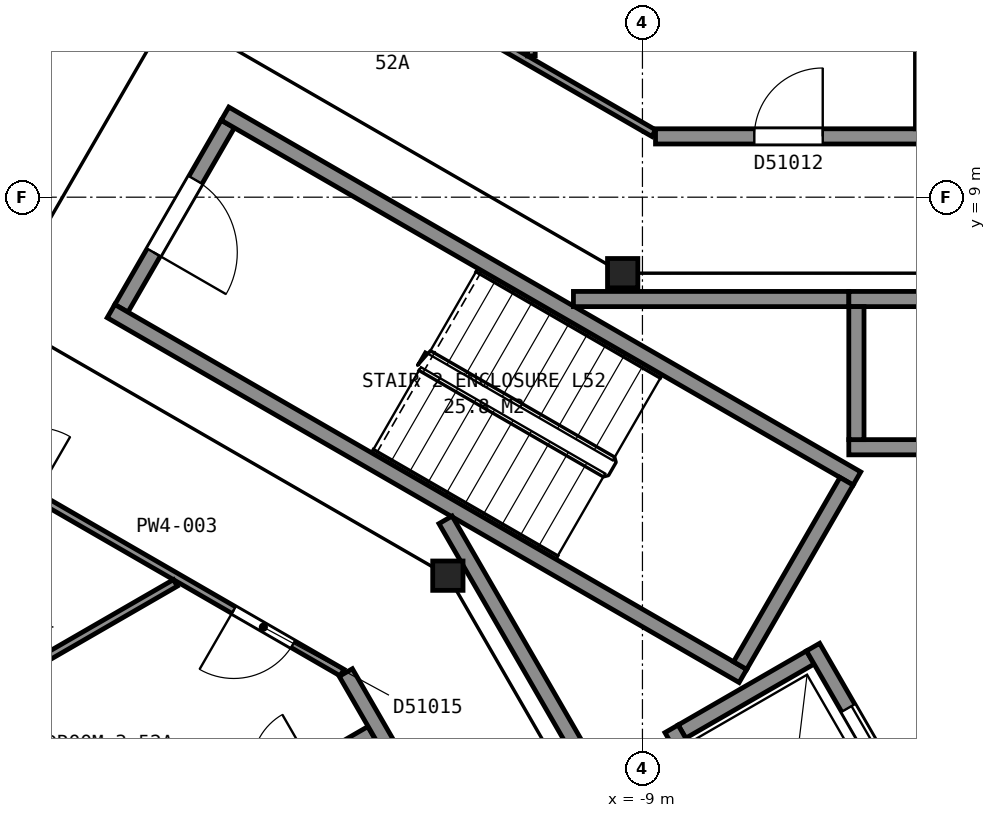
"""IFC4 building model, lengths in metres.
Left out: names, types, materials, properties, quantities, classifications, styles, units other than length and angle.
Written with IfcOpenShell. Run it as: python <this file> out.ifc"""

import sys

from ifc_helpers import new_model, si_unit, direction, frame, frame_2d, origin, origin_2d, place, context, subcontext, project, spatial, rectangle, i_section, extrude, element, fill, save


model = new_model("IFC4")
c1 = context("Model", 3, precision=1e-05, world=origin(), true_north=direction((0.0, 1.0)))
c2 = subcontext(c1, "Body", "Model", "MODEL_VIEW")
j1 = project(units=[si_unit("LENGTHUNIT", "METRE"), si_unit("PLANEANGLEUNIT", "RADIAN")], contexts=[c1])
p1 = place(None, origin())
s1 = spatial("IfcSite", under=j1, at=p1, CompositionType="ELEMENT")
p2 = place(p1, origin())
s2 = spatial("IfcBuilding", under=s1, at=p2, CompositionType="ELEMENT")
p3 = place(p2, frame((0.0, 0.0, 210.1)))
s3 = spatial("IfcBuildingStorey", under=s2, at=p3, CompositionType="ELEMENT", Elevation=210.1)
for number, where, z_axis, x_axis in (
    (1, (-9.26, 8.0, 0.0), (0.0, 0.0, 1.0), (1.0, 0.0, 0.0)),
    (2, (-11.56, 4.02, 0.0), (0.0, 0.0, 1.0), (1.0, 0.0, 0.0)),
):
    element("IfcColumn", number, at=place(p3, frame(where, z_axis=z_axis, x_axis=x_axis)), inside=s3, PredefinedType="COLUMN", context=c2, shape_type="SweptSolid", body=[
        extrude(i_section(OverallWidth=0.399, OverallDepth=0.386, WebThickness=0.021, FlangeThickness=0.033, FilletRadius=0.015, at=origin_2d()), origin(), (0.0, 0.0, 1.0), 3.7),
    ])
p4 = place(p3, frame((-14.455, 9.962, 0.0), z_axis=(0.0, 0.0, 1.0), x_axis=(-0.500049511043, -0.865996816683, 0.0)))
e3 = element("IfcWall", 3, at=p4, inside=s3, PredefinedType="PARTITIONING", context=c2, shape_type="SweptSolid", body=[
    extrude(rectangle(XDim=2.8, YDim=0.2, at=frame_2d((1.4, 0.0))), origin(), (0.0, 0.0, 1.0), 3.45),
])
p5 = place(p4, frame((0.85, 0.0, 0.0)))
e4 = element("IfcOpeningElement", 4, at=p5, cuts=e3, PredefinedType="OPENING", context=c2, shape_type="SweptSolid", body=[
    extrude(rectangle(XDim=1.1, YDim=2.1, at=frame_2d((0.55, 1.05))), frame((0.0, 0.11, 0.0), z_axis=(0.0, -1.0, 0.0), x_axis=(1.0, 0.0, 0.0)), (0.0, 0.0, 1.0), 0.22),
])
for number, where, z_axis, x_axis in (
    (5, (-7.678, 2.701, 0.0), (0.0, 0.0, 1.0), (-0.866, 0.5, 0.0)),
    (6, (-6.178, 5.299, 0.0), (0.0, 0.0, 1.0), (-0.866, 0.5, 0.0)),
):
    element("IfcWall", number, at=place(p3, frame(where, z_axis=z_axis, x_axis=x_axis)), inside=s3, PredefinedType="PARTITIONING", context=c2, shape_type="SweptSolid", body=[
        extrude(rectangle(XDim=9.6, YDim=0.2, at=frame_2d((4.8, 0.0))), origin(), (0.0, 0.0, 1.0), 3.45),
    ])
p6 = place(p3, frame((-6.315, 5.262, 0.0), z_axis=(0.0, 0.0, 1.0), x_axis=(-0.500049511043, -0.865996816683, 0.0)))
e7 = element("IfcWall", 7, at=p6, inside=s3, PredefinedType="PARTITIONING", context=c2, shape_type="SweptSolid", body=[
    extrude(rectangle(XDim=2.8, YDim=0.2, at=frame_2d((1.4, 0.0))), origin(), (0.0, 0.0, 1.0), 3.45),
])
for number, where, z_axis, x_axis in (
    (8, (-6.285, 5.71, 0.0), (0.0, 0.0, 1.0), (1.0, 0.0, 0.0)),
    (9, (-6.285, 7.66, 0.0), (0.0, 0.0, 1.0), (1.0, 0.0, 0.0)),
):
    element("IfcWall", number, at=place(p3, frame(where, z_axis=z_axis, x_axis=x_axis)), inside=s3, PredefinedType="PARTITIONING", context=c2, shape_type="SweptSolid", body=[
        extrude(rectangle(XDim=2.35, YDim=0.2, at=frame_2d((1.175, 0.0))), origin(), (0.0, 0.0, 1.0), 3.7),
    ])
p7 = place(p3, frame((-8.48, 1.969, 0.0), z_axis=(0.0, 0.0, 1.0), x_axis=(0.866000020948, 0.500043961785, 0.0)))
e10 = element("IfcWall", 10, at=p7, inside=s3, PredefinedType="PARTITIONING", context=c2, shape_type="SweptSolid", body=[
    extrude(rectangle(XDim=1.95, YDim=0.2, at=frame_2d((0.975, 0.0))), origin(), (0.0, 0.0, 1.0), 3.7),
])
p8 = place(p3, frame((-6.185, 5.81, 0.0), z_axis=(0.0, 0.0, 1.0), x_axis=(0.0, 1.0, 0.0)))
e11 = element("IfcWall", 11, at=p8, inside=s3, PredefinedType="PARTITIONING", context=c2, shape_type="SweptSolid", body=[
    extrude(rectangle(XDim=1.75, YDim=0.2, at=frame_2d((0.875, 0.0))), origin(), (0.0, 0.0, 1.0), 3.7),
])
p9 = place(p3, frame((-5.28, 0.525, 0.0), z_axis=(0.0, 0.0, 1.0), x_axis=(-0.500037662692, 0.866003658127, 0.0)))
e12 = element("IfcWall", 12, at=p9, inside=s3, PredefinedType="PARTITIONING", context=c2, shape_type="SweptSolid", body=[
    extrude(rectangle(XDim=2.95, YDim=0.2, at=frame_2d((1.475, 0.0))), origin(), (0.0, 0.0, 1.0), 3.7),
])
p10 = place(p9, frame((0.925, 0.0, 0.0)))
e13 = element("IfcOpeningElement", 13, at=p10, cuts=e12, PredefinedType="OPENING", context=c2, shape_type="SweptSolid", body=[
    extrude(rectangle(XDim=1.1, YDim=2.1, at=frame_2d((0.55, 1.05))), frame((0.0, 0.11, 0.0), z_axis=(0.0, -1.0, 0.0), x_axis=(1.0, 0.0, 0.0)), (0.0, 0.0, 1.0), 0.22),
])
p11 = place(p3, frame((-7.242, -0.376, 0.0), z_axis=(0.0, 0.0, 1.0), x_axis=(-0.499996545922, 0.866027397988, 0.0)))
e14 = element("IfcWall", 14, at=p11, inside=s3, PredefinedType="PARTITIONING", context=c2, shape_type="SweptSolid", body=[
    extrude(rectangle(XDim=2.75, YDim=0.2, at=frame_2d((1.375, 0.0))), origin(), (0.0, 0.0, 1.0), 3.7),
])
p12 = place(p3, frame((-11.591, 4.755, 0.0), z_axis=(0.0, 0.0, 1.0), x_axis=(0.500043977787, -0.866000011708, 0.0)))
e15 = element("IfcWall", 15, at=p12, inside=s3, PredefinedType="PARTITIONING", context=c2, shape_type="SweptSolid", body=[
    extrude(rectangle(XDim=6.617, YDim=0.2, at=frame_2d((3.308, 0.0))), origin(), (0.0, 0.0, 1.0), 3.45),
])
p13 = place(p12, frame((3.695, 0.0, 0.0)))
e16 = element("IfcOpeningElement", 16, at=p13, cuts=e15, PredefinedType="OPENING", context=c2, shape_type="SweptSolid", body=[
    extrude(rectangle(XDim=1.8, YDim=2.1, at=frame_2d((0.9, 1.05))), frame((0.0, 0.11, 0.0), z_axis=(0.0, -1.0, 0.0), x_axis=(1.0, 0.0, 0.0)), (0.0, 0.0, 1.0), 0.22),
])
p14 = place(p3, frame((-9.908, 7.66, 0.0), z_axis=(0.0, 0.0, 1.0), x_axis=(1.0, 0.0, 0.0)))
e17 = element("IfcWall", 17, at=p14, inside=s3, PredefinedType="PARTITIONING", context=c2, shape_type="SweptSolid", body=[
    extrude(rectangle(XDim=3.621, YDim=0.2, at=frame_2d((1.811, 0.0))), origin(), (0.0, 0.0, 1.0), 3.45),
])
p15 = place(p3, frame((-19.955, 6.844, 0.0), z_axis=(0.0, 0.0, 1.0), x_axis=(0.500415732313, 0.865785247537, 0.0)))
e18 = element("IfcWall", 18, at=p15, inside=s3, PredefinedType="PARTITIONING", context=c2, shape_type="SweptSolid", body=[
    extrude(rectangle(XDim=8.097, YDim=0.1, at=frame_2d((4.049, 0.0))), origin(), (0.0, 0.0, 1.0), 2.713),
])
p16 = place(p15, frame((3.6, 0.0, 0.0)))
e19 = element("IfcOpeningElement", 19, at=p16, cuts=e18, PredefinedType="OPENING", context=c2, shape_type="SweptSolid", body=[
    extrude(rectangle(XDim=0.9, YDim=2.1, at=frame_2d((0.45, 1.05))), frame((0.0, 0.06, 0.0), z_axis=(0.0, -1.0, 0.0), x_axis=(1.0, 0.0, 0.0)), (0.0, 0.0, 1.0), 0.12),
])
p17 = place(p3, frame((-12.952, 2.744, 0.0), z_axis=(0.0, 0.0, 1.0), x_axis=(-0.86608949446, 0.499888975259, 0.0)))
e20 = element("IfcWall", 20, at=p17, inside=s3, PredefinedType="PARTITIONING", context=c2, shape_type="SweptSolid", body=[
    extrude(rectangle(XDim=8.165, YDim=0.1, at=frame_2d((4.083, 0.0))), origin(), (0.0, 0.0, 1.0), 2.713),
])
p18 = place(p17, frame((4.65, 0.0, 0.0)))
e21 = element("IfcOpeningElement", 21, at=p18, cuts=e20, PredefinedType="OPENING", context=c2, shape_type="SweptSolid", body=[
    extrude(rectangle(XDim=0.9, YDim=2.1, at=frame_2d((0.45, 1.05))), frame((0.0, 0.06, 0.0), z_axis=(0.0, -1.0, 0.0), x_axis=(1.0, 0.0, 0.0)), (0.0, 0.0, 1.0), 0.12),
])
p19 = place(p17, frame((0.746, 0.0, 0.0)))
e22 = element("IfcOpeningElement", 22, at=p19, cuts=e20, PredefinedType="OPENING", context=c2, shape_type="SweptSolid", body=[
    extrude(rectangle(XDim=0.9, YDim=2.1, at=frame_2d((0.45, 1.05))), frame((0.0, 0.06, 0.0), z_axis=(0.0, -1.0, 0.0), x_axis=(1.0, 0.0, 0.0)), (0.0, 0.0, 1.0), 0.12),
])
p20 = place(p3, frame((-18.308, 2.099, 0.0), z_axis=(0.0, 0.0, 1.0), x_axis=(0.866054218355, 0.499950088379, 0.0)))
e23 = element("IfcWall", 23, at=p20, inside=s3, PredefinedType="PARTITIONING", context=c2, shape_type="SweptSolid", body=[
    extrude(rectangle(XDim=3.652, YDim=0.1, at=frame_2d((1.826, 0.0))), origin(), (0.0, 0.0, 1.0), 2.713),
])
p21 = place(p3, frame((-15.921, 13.923, 0.0), z_axis=(0.0, 0.0, 1.0), x_axis=(0.866088973199, -0.499889878377, 0.0)))
e24 = element("IfcWall", 24, at=p21, inside=s3, PredefinedType="PARTITIONING", context=c2, shape_type="SweptSolid", body=[
    extrude(rectangle(XDim=8.163, YDim=0.1, at=frame_2d((4.082, 0.0))), origin(), (0.0, 0.0, 1.0), 2.713),
])
p22 = place(p3, frame((-12.563, 1.948, 0.0), z_axis=(0.0, 0.0, 1.0), x_axis=(-0.866041588165, -0.499971966783, 0.0)))
e25 = element("IfcWall", 25, at=p22, inside=s3, PredefinedType="PARTITIONING", context=c2, shape_type="SweptSolid", body=[
    extrude(rectangle(XDim=2.795, YDim=0.2, at=frame_2d((1.397, 0.0))), origin(), (0.0, 0.0, 1.0), 2.713),
])
p23 = place(p22, frame((0.895, 0.0, 0.0)))
e26 = element("IfcOpeningElement", 26, at=p23, cuts=e25, PredefinedType="OPENING", context=c2, shape_type="SweptSolid", body=[
    extrude(rectangle(XDim=0.8, YDim=2.1, at=frame_2d((0.4, 1.05))), frame((0.0, 0.11, 0.0), z_axis=(0.0, -1.0, 0.0), x_axis=(1.0, 0.0, 0.0)), (0.0, 0.0, 1.0), 0.22),
])
p24 = place(p3, frame((-4.075, -12.545, 0.0), z_axis=(0.0, 0.0, 1.0), x_axis=(-0.499999743747, 0.866025551732, 0.0)))
e27 = element("IfcWall", 27, at=p24, inside=s3, PredefinedType="PARTITIONING", context=c2, shape_type="SweptSolid", body=[
    extrude(rectangle(XDim=17.656, YDim=0.2, at=frame_2d((8.828, 0.0))), origin(), (0.0, 0.0, 1.0), 2.713),
])
p25 = place(p24, frame((9.895, 0.0, 0.0)))
e28 = element("IfcOpeningElement", 28, at=p25, cuts=e27, PredefinedType="OPENING", context=c2, shape_type="SweptSolid", body=[
    extrude(rectangle(XDim=0.9, YDim=2.1, at=frame_2d((0.45, 1.05))), frame((0.0, 0.11, 0.0), z_axis=(0.0, -1.0, 0.0), x_axis=(1.0, 0.0, 0.0)), (0.0, 0.0, 1.0), 0.22),
])
p26 = place(p24, frame((6.622, 0.0, 0.0)))
e29 = element("IfcOpeningElement", 29, at=p26, cuts=e27, PredefinedType="OPENING", context=c2, shape_type="SweptSolid", body=[
    extrude(rectangle(XDim=0.9, YDim=2.1, at=frame_2d((0.45, 1.05))), frame((0.0, 0.11, 0.0), z_axis=(0.0, -1.0, 0.0), x_axis=(1.0, 0.0, 0.0)), (0.0, 0.0, 1.0), 0.22),
])
p27 = place(p24, frame((0.268, 0.0, 0.0)))
e30 = element("IfcOpeningElement", 30, at=p27, cuts=e27, PredefinedType="OPENING", context=c2, shape_type="SweptSolid", body=[
    extrude(rectangle(XDim=0.9, YDim=2.1, at=frame_2d((0.45, 1.05))), frame((0.0, 0.11, 0.0), z_axis=(0.0, -1.0, 0.0), x_axis=(1.0, 0.0, 0.0)), (0.0, 0.0, 1.0), 0.22),
])
p28 = place(p3, frame((-10.461, 10.859, 0.0), z_axis=(0.0, 0.0, 1.0), x_axis=(0.0, 1.0, 0.0)))
e31 = element("IfcWall", 31, at=p28, inside=s3, PredefinedType="PARTITIONING", context=c2, shape_type="SweptSolid", body=[
    extrude(rectangle(XDim=3.947, YDim=0.1, at=frame_2d((1.974, 0.0))), origin(), (0.0, 0.0, 1.0), 2.713),
])
p29 = place(p3, frame((-8.828, 9.8, 0.0), z_axis=(0.0, 0.0, 1.0), x_axis=(1.0, 0.0, 0.0)))
e32 = element("IfcWall", 32, at=p29, inside=s3, PredefinedType="PARTITIONING", context=c2, shape_type="SweptSolid", body=[
    extrude(rectangle(XDim=17.706, YDim=0.2, at=frame_2d((8.853, 0.0))), origin(), (0.0, 0.0, 1.0), 2.713),
])
p30 = place(p29, frame((14.976, 0.0, 0.0)))
e33 = element("IfcOpeningElement", 33, at=p30, cuts=e32, PredefinedType="OPENING", context=c2, shape_type="SweptSolid", body=[
    extrude(rectangle(XDim=0.9, YDim=2.1, at=frame_2d((0.45, 1.05))), frame((0.0, 0.11, 0.0), z_axis=(0.0, -1.0, 0.0), x_axis=(1.0, 0.0, 0.0)), (0.0, 0.0, 1.0), 0.22),
])
p31 = place(p29, frame((10.673, 0.0, 0.0)))
e34 = element("IfcOpeningElement", 34, at=p31, cuts=e32, PredefinedType="OPENING", context=c2, shape_type="SweptSolid", body=[
    extrude(rectangle(XDim=0.9, YDim=2.1, at=frame_2d((0.45, 1.05))), frame((0.0, 0.11, 0.0), z_axis=(0.0, -1.0, 0.0), x_axis=(1.0, 0.0, 0.0)), (0.0, 0.0, 1.0), 0.22),
])
p32 = place(p29, frame((5.57, 0.0, 0.0)))
e35 = element("IfcOpeningElement", 35, at=p32, cuts=e32, PredefinedType="OPENING", context=c2, shape_type="SweptSolid", body=[
    extrude(rectangle(XDim=0.9, YDim=2.1, at=frame_2d((0.45, 1.05))), frame((0.0, 0.11, 0.0), z_axis=(0.0, -1.0, 0.0), x_axis=(1.0, 0.0, 0.0)), (0.0, 0.0, 1.0), 0.22),
])
p33 = place(p29, frame((1.3, 0.0, 0.0)))
e36 = element("IfcOpeningElement", 36, at=p33, cuts=e32, PredefinedType="OPENING", context=c2, shape_type="SweptSolid", body=[
    extrude(rectangle(XDim=0.9, YDim=2.1, at=frame_2d((0.45, 1.05))), frame((0.0, 0.11, 0.0), z_axis=(0.0, -1.0, 0.0), x_axis=(1.0, 0.0, 0.0)), (0.0, 0.0, 1.0), 0.22),
])
p34 = place(p3, frame((-5.358, 9.9, 0.0), z_axis=(0.0, 0.0, 1.0), x_axis=(0.0, 1.0, 0.0)))
e37 = element("IfcWall", 37, at=p34, inside=s3, PredefinedType="PARTITIONING", context=c2, shape_type="SweptSolid", body=[
    extrude(rectangle(XDim=4.906, YDim=0.1, at=frame_2d((2.453, 0.0))), origin(), (0.0, 0.0, 1.0), 2.713),
])
p35 = place(p5, origin())
e38 = element("IfcDoor", 38, at=p35, inside=s3, OperationType="SINGLE_SWING_RIGHT", PredefinedType="DOOR", context=c2, shape_type="SweptSolid", body=[
    extrude(rectangle(XDim=1.1, YDim=2.1, at=frame_2d((0.55, 1.05))), frame((0.0, 0.025, 0.0), z_axis=(0.0, -1.0, 0.0), x_axis=(1.0, 0.0, 0.0)), (0.0, 0.0, 1.0), 0.05),
])
fill(e4, e38)
p36 = place(p10, origin())
e39 = element("IfcDoor", 39, at=p36, inside=s3, OperationType="SLIDING_TO_LEFT", PredefinedType="DOOR", context=c2, shape_type="SweptSolid", body=[
    extrude(rectangle(XDim=1.1, YDim=2.1, at=frame_2d((0.55, 1.05))), frame((0.0, 0.025, 0.0), z_axis=(0.0, -1.0, 0.0), x_axis=(1.0, 0.0, 0.0)), (0.0, 0.0, 1.0), 0.05),
])
fill(e13, e39)
p37 = place(p19, origin())
e40 = element("IfcDoor", 40, at=p37, inside=s3, OperationType="SINGLE_SWING_RIGHT", PredefinedType="DOOR", context=c2, shape_type="SweptSolid", body=[
    extrude(rectangle(XDim=0.9, YDim=2.1, at=frame_2d((0.45, 1.05))), frame((0.0, 0.025, 0.0), z_axis=(0.0, -1.0, 0.0), x_axis=(1.0, 0.0, 0.0)), (0.0, 0.0, 1.0), 0.05),
])
fill(e22, e40)
p38 = place(p33, origin())
e41 = element("IfcDoor", 41, at=p38, inside=s3, OperationType="SINGLE_SWING_RIGHT", PredefinedType="DOOR", context=c2, shape_type="SweptSolid", body=[
    extrude(rectangle(XDim=0.9, YDim=2.1, at=frame_2d((0.45, 1.05))), frame((0.0, 0.025, 0.0), z_axis=(0.0, -1.0, 0.0), x_axis=(1.0, 0.0, 0.0)), (0.0, 0.0, 1.0), 0.05),
])
fill(e36, e41)
save(model, sys.argv[1])
